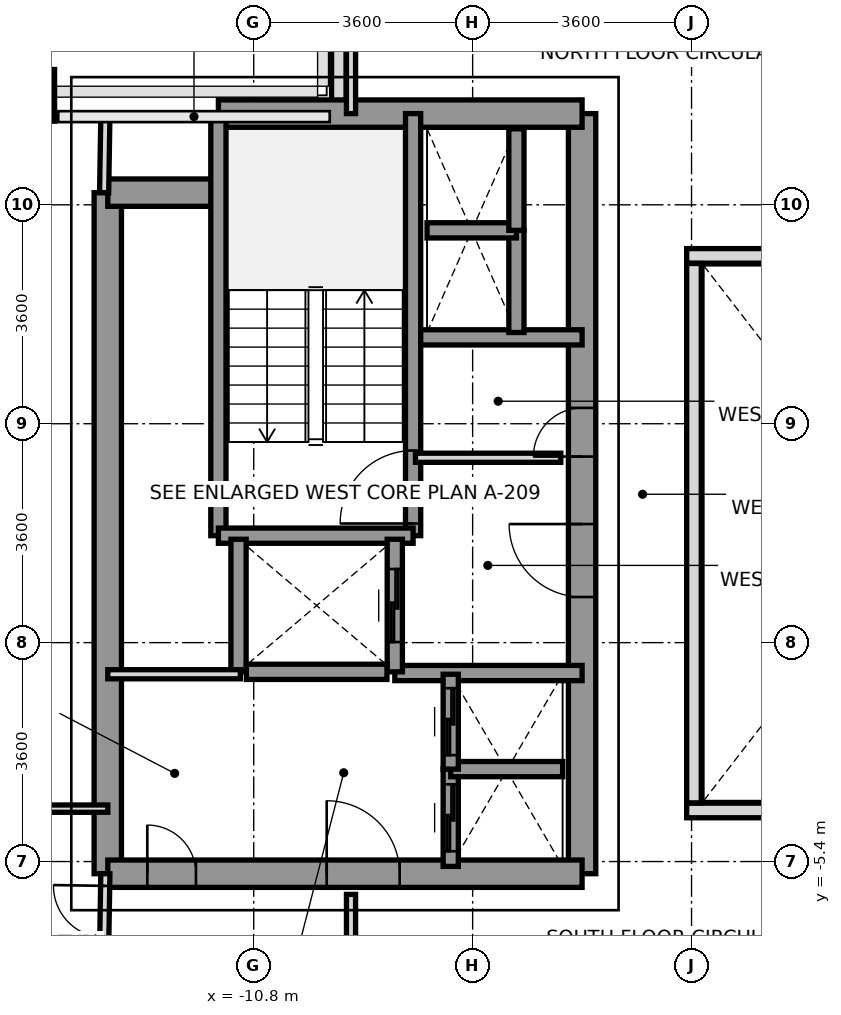
"""IFC4 building model, lengths in metres.
Left out: names, types, materials, properties, quantities, classifications, styles, units other than length and angle.
Written with IfcOpenShell. Run it as: python <this file> out.ifc"""

import sys

from ifc_helpers import new_model, si_unit, direction, frame, frame_2d, origin, origin_2d, place, context, subcontext, project, spatial, rectangle, extrude, source, transform, mapped, element, fill, save


model = new_model("IFC4")
c1 = context("Model", 3, precision=1e-05, world=origin(), true_north=direction((0.0, 1.0)))
c2 = subcontext(c1, "Body", "Model", "MODEL_VIEW")
j1 = project(units=[si_unit("LENGTHUNIT", "METRE"), si_unit("PLANEANGLEUNIT", "RADIAN")], contexts=[c1])
p1 = place(None, origin())
s1 = spatial("IfcSite", under=j1, at=p1, CompositionType="ELEMENT")
p2 = place(p1, origin())
s2 = spatial("IfcBuilding", under=s1, at=p2, CompositionType="ELEMENT")
p3 = place(p2, frame((0.0, 0.0, 104.0)))
s3 = spatial("IfcBuildingStorey", under=s2, at=p3, CompositionType="ELEMENT", Elevation=104.0)
m1 = source(origin(), c2, "Body", "SweptSolid", [
    extrude(rectangle(XDim=0.65, YDim=0.85, at=origin_2d()), origin(), (0.0, 0.0, 1.0), 3.2),
])
p4 = place(p3, frame((-14.4, 7.2, 0.0), z_axis=(0.0, 0.0, 1.0), x_axis=(1.0, 0.0, 0.0)))
e1 = element("IfcColumn", 1, at=p4, inside=s3, PredefinedType="COLUMN", context=c2, shape_type="MappedRepresentation", body=[
    mapped(m1, transform((0.0, 0.0, 0.0), x_axis=(1.0, 0.0, 0.0), y_axis=(0.0, 1.0, 0.0), z_axis=(0.0, 0.0, 1.0), scale=1.0)),
])
p5 = place(p3, frame((-9.4, 6.953, 0.0), z_axis=(0.0, 0.0, 1.0), x_axis=(0.0, 1.0, 0.0)))
e2 = element("IfcWall", 2, at=p5, inside=s3, PredefinedType="PARAPET", context=c2, shape_type="SweptSolid", body=[
    extrude(rectangle(XDim=1.519, YDim=0.24, at=frame_2d((0.76, 0.0))), origin(), (0.0, 0.0, 1.0), 1.15),
])
p6 = place(p3, frame((-13.2, -5.6, 0.0), z_axis=(0.0, 0.0, 1.0), x_axis=(0.0, 1.0, 0.0)))
e3 = element("IfcWall", 3, at=p6, inside=s3, PredefinedType="SHEAR", context=c2, shape_type="SweptSolid", body=[
    extrude(rectangle(XDim=11.2, YDim=0.45, at=frame_2d((5.6, 0.0))), origin(), (0.0, 0.0, 1.0), 3.2),
])
p7 = place(p3, frame((-5.4, -5.6, 0.0), z_axis=(0.0, 0.0, 1.0), x_axis=(0.0, 1.0, 0.0)))
e4 = element("IfcWall", 4, at=p7, inside=s3, PredefinedType="SHEAR", context=c2, shape_type="SweptSolid", body=[
    extrude(rectangle(XDim=12.5, YDim=0.45, at=frame_2d((6.25, 0.0))), origin(), (0.0, 0.0, 1.0), 3.2),
])
p8 = place(p7, frame((4.55, 0.0, 0.0)))
e5 = element("IfcOpeningElement", 5, at=p8, cuts=e4, PredefinedType="OPENING", context=c2, shape_type="SweptSolid", body=[
    extrude(rectangle(XDim=1.2, YDim=2.2, at=frame_2d((0.6, 1.1))), frame((0.0, 0.235, 0.0), z_axis=(0.0, -1.0, 0.0), x_axis=(1.0, 0.0, 0.0)), (0.0, 0.0, 1.0), 0.47),
])
p9 = place(p7, frame((6.86, 0.0, 0.0)))
e6 = element("IfcOpeningElement", 6, at=p9, cuts=e4, PredefinedType="OPENING", context=c2, shape_type="SweptSolid", body=[
    extrude(rectangle(XDim=0.8, YDim=2.1, at=frame_2d((0.4, 1.05))), frame((0.0, 0.235, 0.0), z_axis=(0.0, -1.0, 0.0), x_axis=(1.0, 0.0, 0.0)), (0.0, 0.0, 1.0), 0.47),
])
p10 = place(p3, frame((-11.381, 6.9, 0.0), z_axis=(0.0, 0.0, 1.0), x_axis=(1.0, 0.0, 0.0)))
e7 = element("IfcWall", 7, at=p10, inside=s3, PredefinedType="SHEAR", context=c2, shape_type="SweptSolid", body=[
    extrude(rectangle(XDim=5.981, YDim=0.45, at=frame_2d((2.991, 0.0))), origin(), (0.0, 0.0, 1.0), 3.2),
])
p11 = place(p3, frame((-13.2, 5.6, 0.0), z_axis=(0.0, 0.0, 1.0), x_axis=(1.0, 0.0, 0.0)))
e8 = element("IfcWall", 8, at=p11, inside=s3, PredefinedType="SHEAR", context=c2, shape_type="SweptSolid", body=[
    extrude(rectangle(XDim=1.819, YDim=0.45, at=frame_2d((0.909, 0.0))), origin(), (0.0, 0.0, 1.0), 3.2),
])
p12 = place(p3, frame((-13.2, -5.6, 0.0), z_axis=(0.0, 0.0, 1.0), x_axis=(1.0, 0.0, 0.0)))
e9 = element("IfcWall", 9, at=p12, inside=s3, PredefinedType="SHEAR", context=c2, shape_type="SweptSolid", body=[
    extrude(rectangle(XDim=7.8, YDim=0.45, at=frame_2d((3.9, 0.0))), origin(), (0.0, 0.0, 1.0), 3.2),
])
p13 = place(p12, frame((3.6, 0.0, 0.0)))
e10 = element("IfcOpeningElement", 10, at=p13, cuts=e9, PredefinedType="OPENING", context=c2, shape_type="SweptSolid", body=[
    extrude(rectangle(XDim=1.2, YDim=2.2, at=frame_2d((0.6, 1.1))), frame((0.0, 0.235, 0.0), z_axis=(0.0, -1.0, 0.0), x_axis=(1.0, 0.0, 0.0)), (0.0, 0.0, 1.0), 0.47),
])
p14 = place(p12, frame((0.65, 0.0, 0.0)))
e11 = element("IfcOpeningElement", 11, at=p14, cuts=e9, PredefinedType="OPENING", context=c2, shape_type="SweptSolid", body=[
    extrude(rectangle(XDim=0.8, YDim=2.1, at=frame_2d((0.4, 1.05))), frame((0.0, 0.235, 0.0), z_axis=(0.0, -1.0, 0.0), x_axis=(1.0, 0.0, 0.0)), (0.0, 0.0, 1.0), 0.47),
])
p15 = place(p3, frame((-8.18, 3.22, 0.0), z_axis=(0.0, 0.0, 1.0), x_axis=(1.0, 0.0, 0.0)))
e12 = element("IfcWall", 12, at=p15, inside=s3, PredefinedType="SOLIDWALL", context=c2, shape_type="SweptSolid", body=[
    extrude(rectangle(XDim=2.78, YDim=0.25, at=frame_2d((1.39, 0.0))), origin(), (0.0, 0.0, 1.0), 3.2),
])
p16 = place(p3, frame((-8.48, -2.3, 0.0), z_axis=(0.0, 0.0, 1.0), x_axis=(1.0, 0.0, 0.0)))
e13 = element("IfcWall", 13, at=p16, inside=s3, PredefinedType="SOLIDWALL", context=c2, shape_type="SweptSolid", body=[
    extrude(rectangle(XDim=3.08, YDim=0.25, at=frame_2d((1.54, 0.0))), origin(), (0.0, 0.0, 1.0), 3.2),
])
p17 = place(p3, frame((-8.179, -0.041, 0.0), z_axis=(0.0, 0.0, 1.0), x_axis=(0.0, 1.0, 0.0)))
e14 = element("IfcWall", 14, at=p17, inside=s3, PredefinedType="SOLIDWALL", context=c2, shape_type="SweptSolid", body=[
    extrude(rectangle(XDim=6.941, YDim=0.25, at=frame_2d((3.47, 0.0))), origin(), (0.0, 0.0, 1.0), 3.2),
])
p18 = place(p17, frame((0.2, 0.0, 0.0)))
e15 = element("IfcOpeningElement", 15, at=p18, cuts=e14, PredefinedType="OPENING", context=c2, shape_type="SweptSolid", body=[
    extrude(rectangle(XDim=1.2, YDim=2.2, at=frame_2d((0.6, 1.1))), frame((0.0, 0.135, 0.0), z_axis=(0.0, -1.0, 0.0), x_axis=(1.0, 0.0, 0.0)), (0.0, 0.0, 1.0), 0.27),
])
p19 = place(p3, frame((-11.381, -0.041, 0.0), z_axis=(0.0, 0.0, 1.0), x_axis=(0.0, 1.0, 0.0)))
e16 = element("IfcWall", 16, at=p19, inside=s3, PredefinedType="SOLIDWALL", context=c2, shape_type="SweptSolid", body=[
    extrude(rectangle(XDim=6.941, YDim=0.25, at=frame_2d((3.47, 0.0))), origin(), (0.0, 0.0, 1.0), 3.2),
])
p20 = place(p3, frame((-11.381, -0.041, 0.0), z_axis=(0.0, 0.0, 1.0), x_axis=(1.0, 0.0, 0.0)))
e17 = element("IfcWall", 17, at=p20, inside=s3, PredefinedType="SOLIDWALL", context=c2, shape_type="SweptSolid", body=[
    extrude(rectangle(XDim=3.202, YDim=0.25, at=frame_2d((1.601, 0.0))), origin(), (0.0, 0.0, 1.0), 3.2),
])
p21 = place(p3, frame((-11.05, -2.28, 0.0), z_axis=(0.0, 0.0, 1.0), x_axis=(0.0, 1.0, 0.0)))
e18 = element("IfcWall", 18, at=p21, inside=s3, PredefinedType="SOLIDWALL", context=c2, shape_type="SweptSolid", body=[
    extrude(rectangle(XDim=2.18, YDim=0.25, at=frame_2d((1.09, 0.0))), origin(), (0.0, 0.0, 1.0), 3.2),
])
p22 = place(p3, frame((-8.48, -2.28, 0.0), z_axis=(0.0, 0.0, 1.0), x_axis=(0.0, 1.0, 0.0)))
e19 = element("IfcWall", 19, at=p22, inside=s3, PredefinedType="SOLIDWALL", context=c2, shape_type="SweptSolid", body=[
    extrude(rectangle(XDim=2.18, YDim=0.25, at=frame_2d((1.09, 0.0))), origin(), (0.0, 0.0, 1.0), 3.2),
])
p23 = place(p22, frame((0.49, 0.0, 0.0)))
e20 = element("IfcOpeningElement", 20, at=p23, cuts=e19, PredefinedType="OPENING", context=c2, shape_type="SweptSolid", body=[
    extrude(rectangle(XDim=1.2, YDim=2.2, at=frame_2d((0.6, 1.1))), frame((0.0, 0.135, 0.0), z_axis=(0.0, -1.0, 0.0), x_axis=(1.0, 0.0, 0.0)), (0.0, 0.0, 1.0), 0.27),
])
p24 = place(p3, frame((-10.921, -2.28, 0.0), z_axis=(0.0, 0.0, 1.0), x_axis=(1.0, 0.0, 0.0)))
e21 = element("IfcWall", 21, at=p24, inside=s3, PredefinedType="SOLIDWALL", context=c2, shape_type="SweptSolid", body=[
    extrude(rectangle(XDim=2.312, YDim=0.25, at=frame_2d((1.156, 0.0))), origin(), (0.0, 0.0, 1.0), 3.2),
])
p25 = place(p3, frame((-7.56, -5.48, 0.0), z_axis=(0.0, 0.0, 1.0), x_axis=(0.0, 1.0, 0.0)))
e22 = element("IfcWall", 22, at=p25, inside=s3, PredefinedType="SOLIDWALL", context=c2, shape_type="SweptSolid", body=[
    extrude(rectangle(XDim=1.6, YDim=0.25, at=frame_2d((0.8, 0.0))), origin(), (0.0, 0.0, 1.0), 3.2),
])
p26 = place(p25, frame((0.25, 0.0, 0.0)))
e23 = element("IfcOpeningElement", 23, at=p26, cuts=e22, PredefinedType="OPENING", context=c2, shape_type="SweptSolid", body=[
    extrude(rectangle(XDim=1.1, YDim=2.2, at=frame_2d((0.55, 1.1))), frame((0.0, 0.135, 0.0), z_axis=(0.0, -1.0, 0.0), x_axis=(1.0, 0.0, 0.0)), (0.0, 0.0, 1.0), 0.27),
])
p27 = place(p3, frame((-7.56, -3.88, 0.0), z_axis=(0.0, 0.0, 1.0), x_axis=(1.0, 0.0, 0.0)))
e24 = element("IfcWall", 24, at=p27, inside=s3, PredefinedType="SOLIDWALL", context=c2, shape_type="SweptSolid", body=[
    extrude(rectangle(XDim=1.84, YDim=0.25, at=frame_2d((0.92, 0.0))), origin(), (0.0, 0.0, 1.0), 3.2),
])
p28 = place(p3, frame((-7.56, -3.88, 0.0), z_axis=(0.0, 0.0, 1.0), x_axis=(0.0, 1.0, 0.0)))
e25 = element("IfcWall", 25, at=p28, inside=s3, PredefinedType="SOLIDWALL", context=c2, shape_type="SweptSolid", body=[
    extrude(rectangle(XDim=1.56, YDim=0.25, at=frame_2d((0.78, 0.0))), origin(), (0.0, 0.0, 1.0), 3.2),
])
p29 = place(p28, frame((0.23, 0.0, 0.0)))
e26 = element("IfcOpeningElement", 26, at=p29, cuts=e25, PredefinedType="OPENING", context=c2, shape_type="SweptSolid", body=[
    extrude(rectangle(XDim=1.1, YDim=2.2, at=frame_2d((0.55, 1.1))), frame((0.0, 0.135, 0.0), z_axis=(0.0, -1.0, 0.0), x_axis=(1.0, 0.0, 0.0)), (0.0, 0.0, 1.0), 0.27),
])
p30 = place(p3, frame((-6.48, 3.3, 0.0), z_axis=(0.0, 0.0, 1.0), x_axis=(0.0, 1.0, 0.0)))
e27 = element("IfcWall", 27, at=p30, inside=s3, PredefinedType="SOLIDWALL", context=c2, shape_type="SweptSolid", body=[
    extrude(rectangle(XDim=1.68, YDim=0.25, at=frame_2d((0.84, 0.0))), origin(), (0.0, 0.0, 1.0), 3.2),
])
p31 = place(p3, frame((-7.95, 4.98, 0.0), z_axis=(0.0, 0.0, 1.0), x_axis=(1.0, 0.0, 0.0)))
e28 = element("IfcWall", 28, at=p31, inside=s3, PredefinedType="SOLIDWALL", context=c2, shape_type="SweptSolid", body=[
    extrude(rectangle(XDim=1.47, YDim=0.25, at=frame_2d((0.735, 0.0))), origin(), (0.0, 0.0, 1.0), 3.2),
])
p32 = place(p3, frame((-6.48, 4.98, 0.0), z_axis=(0.0, 0.0, 1.0), x_axis=(0.0, 1.0, 0.0)))
e29 = element("IfcWall", 29, at=p32, inside=s3, PredefinedType="SOLIDWALL", context=c2, shape_type="SweptSolid", body=[
    extrude(rectangle(XDim=1.67, YDim=0.25, at=frame_2d((0.835, 0.0))), origin(), (0.0, 0.0, 1.0), 3.2),
])
p33 = place(p3, frame((-8.14, 1.24, 0.0), z_axis=(0.0, 0.0, 1.0), x_axis=(1.0, 0.0, 0.0)))
e30 = element("IfcWall", 30, at=p33, inside=s3, PredefinedType="PARTITIONING", context=c2, shape_type="SweptSolid", body=[
    extrude(rectangle(XDim=2.39, YDim=0.15, at=frame_2d((1.195, 0.0))), origin(), (0.0, 0.0, 1.0), 2.3),
])
p34 = place(p3, frame((-13.2, -2.32, 0.0), z_axis=(0.0, 0.0, 1.0), x_axis=(1.0, 0.0, 0.0)))
e31 = element("IfcWall", 31, at=p34, inside=s3, PredefinedType="PARTITIONING", context=c2, shape_type="SweptSolid", body=[
    extrude(rectangle(XDim=2.18, YDim=0.15, at=frame_2d((1.09, 0.0))), origin(), (0.0, 0.0, 1.0), 3.2),
])
p35 = place(p3, frame((-9.2, 6.9, 0.0), z_axis=(0.0, 0.0, 1.0), x_axis=(0.0, 1.0, 0.0)))
e32 = element("IfcWall", 32, at=p35, inside=s3, PredefinedType="PARTITIONING", context=c2, shape_type="SweptSolid", body=[
    extrude(rectangle(XDim=8.78, YDim=0.15, at=frame_2d((4.39, 0.0))), origin(), (0.0, 0.0, 1.0), 2.7),
])
p36 = place(p3, frame((-9.2, -15.68, 0.0), z_axis=(0.0, 0.0, 1.0), x_axis=(0.0, 1.0, 0.0)))
e33 = element("IfcWall", 33, at=p36, inside=s3, PredefinedType="PARTITIONING", context=c2, shape_type="SweptSolid", body=[
    extrude(rectangle(XDim=9.74, YDim=0.15, at=frame_2d((4.87, 0.0))), origin(), (0.0, 0.0, 1.0), 2.7),
])
p37 = place(p3, frame((-13.26, 5.6, 0.0), z_axis=(0.0, 0.0, 1.0), x_axis=(0.016013571389, 0.999871774545, 0.0)))
e34 = element("IfcWall", 34, at=p37, inside=s3, PredefinedType="PARTITIONING", context=c2, shape_type="SweptSolid", body=[
    extrude(rectangle(XDim=1.25, YDim=0.15, at=frame_2d((0.625, 0.0))), origin(), (0.0, 0.0, 1.0), 3.2),
])
p38 = place(p3, frame((-13.26, -6.85, 0.0), z_axis=(0.0, 0.0, 1.0), x_axis=(0.016013571389, 0.999871774545, 0.0)))
e35 = element("IfcWall", 35, at=p38, inside=s3, PredefinedType="PARTITIONING", context=c2, shape_type="SweptSolid", body=[
    extrude(rectangle(XDim=1.25, YDim=0.15, at=frame_2d((0.625, 0.0))), origin(), (0.0, 0.0, 1.0), 3.2),
])
p39 = place(p38, frame((0.2, 0.0, 0.0)))
e36 = element("IfcOpeningElement", 36, at=p39, cuts=e35, PredefinedType="OPENING", context=c2, shape_type="SweptSolid", body=[
    extrude(rectangle(XDim=0.85, YDim=2.1, at=frame_2d((0.425, 1.05))), frame((0.0, 0.085, 0.0), z_axis=(0.0, -1.0, 0.0), x_axis=(1.0, 0.0, 0.0)), (0.0, 0.0, 1.0), 0.17),
])
p40 = place(p3, frame((-23.3, -4.53, 0.0), z_axis=(0.0, 0.0, 1.0), x_axis=(1.0, 0.0, 0.0)))
e37 = element("IfcWall", 37, at=p40, inside=s3, PredefinedType="PARTITIONING", context=c2, shape_type="SweptSolid", body=[
    extrude(rectangle(XDim=10.1, YDim=0.12, at=frame_2d((5.05, 0.0))), origin(), (0.0, 0.0, 1.0), 2.76),
])
p41 = place(p40, frame((2.1, 0.0, 0.0)))
e38 = element("IfcOpeningElement", 38, at=p41, cuts=e37, PredefinedType="OPENING", context=c2, shape_type="SweptSolid", body=[
    extrude(rectangle(XDim=0.95, YDim=2.15, at=frame_2d((0.475, 1.075))), frame((0.0, 0.07, 0.0), z_axis=(0.0, -1.0, 0.0), x_axis=(1.0, 0.0, 0.0)), (0.0, 0.0, 1.0), 0.14),
])
for number, where, z_axis, x_axis in (
    (39, (-3.68, -4.56, 0.0), (0.0, 0.0, 1.0), (1.0, 0.0, 0.0)),
    (40, (-3.68, 4.56, 0.0), (0.0, 0.0, 1.0), (1.0, 0.0, 0.0)),
):
    element("IfcWall", number, at=place(p3, frame(where, z_axis=z_axis, x_axis=x_axis)), inside=s3, PredefinedType="PARAPET", context=c2, shape_type="SweptSolid", body=[
        extrude(rectangle(XDim=7.36, YDim=0.24, at=frame_2d((3.68, 0.0))), origin(), (0.0, 0.0, 1.0), 1.15),
    ])
p42 = place(p3, frame((-3.56, -4.435, 0.0), z_axis=(0.0, 0.0, 1.0), x_axis=(0.0, 1.0, 0.0)))
e41 = element("IfcWall", 41, at=p42, inside=s3, PredefinedType="PARAPET", context=c2, shape_type="SweptSolid", body=[
    extrude(rectangle(XDim=8.87, YDim=0.24, at=frame_2d((4.435, 0.0))), origin(), (0.0, 0.0, 1.0), 1.15),
])
m2 = source(origin(), c2, "Body", "SweptSolid", [
    extrude(rectangle(XDim=1.2, YDim=2.2, at=frame_2d((0.6, 1.1))), frame((0.0, 0.025, 0.0), z_axis=(0.0, -1.0, 0.0), x_axis=(1.0, 0.0, 0.0)), (0.0, 0.0, 1.0), 0.05),
])
p43 = place(p18, origin())
e42 = element("IfcDoor", 42, at=p43, inside=s3, OperationType="SINGLE_SWING_LEFT", PredefinedType="DOOR", context=c2, shape_type="MappedRepresentation", body=[
    mapped(m2, transform((0.0, 0.0, 0.0), x_axis=(1.0, 0.0, 0.0), y_axis=(0.0, 1.0, 0.0), z_axis=(0.0, 0.0, 1.0), scale=1.0)),
])
fill(e15, e42)
p44 = place(p8, origin())
e43 = element("IfcDoor", 43, at=p44, inside=s3, OperationType="SINGLE_SWING_RIGHT", PredefinedType="DOOR", context=c2, shape_type="MappedRepresentation", body=[
    mapped(m2, transform((0.0, 0.0, 0.0), x_axis=(1.0, 0.0, 0.0), y_axis=(0.0, 1.0, 0.0), z_axis=(0.0, 0.0, 1.0), scale=1.0)),
])
fill(e5, e43)
p45 = place(p13, origin())
e44 = element("IfcDoor", 44, at=p45, inside=s3, OperationType="SINGLE_SWING_LEFT", PredefinedType="DOOR", context=c2, shape_type="MappedRepresentation", body=[
    mapped(m2, transform((0.0, 0.0, 0.0), x_axis=(1.0, 0.0, 0.0), y_axis=(0.0, 1.0, 0.0), z_axis=(0.0, 0.0, 1.0), scale=1.0)),
])
fill(e10, e44)
m3 = source(origin(), c2, "Body", "SweptSolid", [
    extrude(rectangle(XDim=0.8, YDim=2.1, at=frame_2d((0.4, 1.05))), frame((0.0, 0.025, 0.0), z_axis=(0.0, -1.0, 0.0), x_axis=(1.0, 0.0, 0.0)), (0.0, 0.0, 1.0), 0.05),
])
p46 = place(p9, origin())
e45 = element("IfcDoor", 45, at=p46, inside=s3, OperationType="SINGLE_SWING_LEFT", PredefinedType="DOOR", context=c2, shape_type="MappedRepresentation", body=[
    mapped(m3, transform((0.0, 0.0, 0.0), x_axis=(1.0, 0.0, 0.0), y_axis=(0.0, 1.0, 0.0), z_axis=(0.0, 0.0, 1.0), scale=1.0)),
])
fill(e6, e45)
p47 = place(p14, origin())
e46 = element("IfcDoor", 46, at=p47, inside=s3, OperationType="SINGLE_SWING_LEFT", PredefinedType="DOOR", context=c2, shape_type="MappedRepresentation", body=[
    mapped(m3, transform((0.0, 0.0, 0.0), x_axis=(1.0, 0.0, 0.0), y_axis=(0.0, 1.0, 0.0), z_axis=(0.0, 0.0, 1.0), scale=1.0)),
])
fill(e11, e46)
p48 = place(p23, origin())
e47 = element("IfcDoor", 47, at=p48, inside=s3, OperationType="SLIDING_TO_RIGHT", PredefinedType="DOOR", context=c2, shape_type="MappedRepresentation", body=[
    mapped(m2, transform((0.0, 0.0, 0.0), x_axis=(1.0, 0.0, 0.0), y_axis=(0.0, 1.0, 0.0), z_axis=(0.0, 0.0, 1.0), scale=1.0)),
])
fill(e20, e47)
m4 = source(origin(), c2, "Body", "SweptSolid", [
    extrude(rectangle(XDim=1.1, YDim=2.2, at=frame_2d((0.55, 1.1))), frame((0.0, 0.025, 0.0), z_axis=(0.0, -1.0, 0.0), x_axis=(1.0, 0.0, 0.0)), (0.0, 0.0, 1.0), 0.05),
])
p49 = place(p26, origin())
e48 = element("IfcDoor", 48, at=p49, inside=s3, OperationType="SLIDING_TO_LEFT", PredefinedType="DOOR", context=c2, shape_type="MappedRepresentation", body=[
    mapped(m4, transform((0.0, 0.0, 0.0), x_axis=(1.0, 0.0, 0.0), y_axis=(0.0, 1.0, 0.0), z_axis=(0.0, 0.0, 1.0), scale=1.0)),
])
fill(e23, e48)
p50 = place(p29, origin())
e49 = element("IfcDoor", 49, at=p50, inside=s3, OperationType="SLIDING_TO_LEFT", PredefinedType="DOOR", context=c2, shape_type="MappedRepresentation", body=[
    mapped(m4, transform((0.0, 0.0, 0.0), x_axis=(1.0, 0.0, 0.0), y_axis=(0.0, 1.0, 0.0), z_axis=(0.0, 0.0, 1.0), scale=1.0)),
])
fill(e26, e49)
m5 = source(origin(), c2, "Body", "SweptSolid", [
    extrude(rectangle(XDim=0.85, YDim=2.1, at=frame_2d((0.425, 1.05))), frame((0.0, 0.025, 0.0), z_axis=(0.0, -1.0, 0.0), x_axis=(1.0, 0.0, 0.0)), (0.0, 0.0, 1.0), 0.05),
])
p51 = place(p39, origin())
e50 = element("IfcDoor", 50, at=p51, inside=s3, OperationType="SINGLE_SWING_RIGHT", PredefinedType="DOOR", context=c2, shape_type="MappedRepresentation", body=[
    mapped(m5, transform((0.0, 0.0, 0.0), x_axis=(1.0, 0.0, 0.0), y_axis=(0.0, 1.0, 0.0), z_axis=(0.0, 0.0, 1.0), scale=1.0)),
])
fill(e36, e50)
save(model, sys.argv[1])
